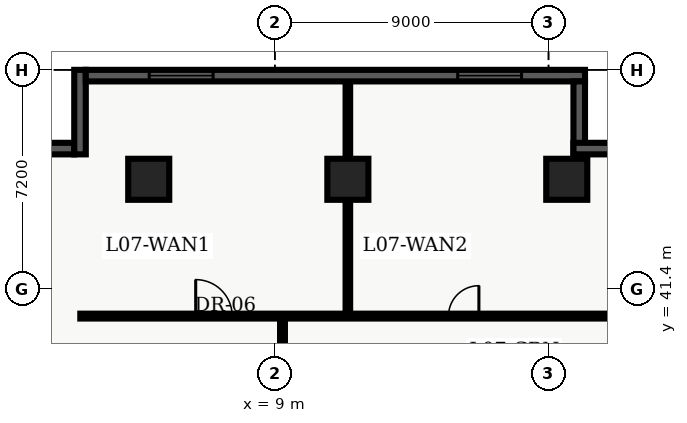
"""IFC4 building model, lengths in metres.
Left out: names, types, materials, properties, quantities, classifications, styles, units other than length and angle.
Written with IfcOpenShell. Run it as: python <this file> out.ifc"""

import sys

from ifc_helpers import new_model, entity, si_unit, converted_unit, direction, frame, origin_with_axes, origin_2d_with_axis, place, context, subcontext, project, spatial, polyline, rectangle, outline, extrude, element, fill, save


model = new_model("IFC4")
c1 = context("Model", 3, precision=1e-05, world=origin_with_axes(), true_north=direction((0.0, 1.0)))
c2 = subcontext(c1, "Body", "Model", "MODEL_VIEW")
j1 = project(units=[si_unit("LENGTHUNIT", "METRE"), converted_unit("PLANEANGLEUNIT", "DEGREE", entity("IfcPlaneAngleMeasure", 0.017), si_unit("PLANEANGLEUNIT", "RADIAN"), dimensions=[0, 0, 0, 0, 0, 0, 0])], contexts=[c1])
p1 = place(None, origin_with_axes())
s1 = spatial("IfcSite", under=j1, at=p1, CompositionType="ELEMENT")
p2 = place(p1, origin_with_axes())
s2 = spatial("IfcBuilding", under=s1, at=p2, CompositionType="ELEMENT")
p3 = place(p2, frame((0.0, 0.0, 32.7), z_axis=(0.0, 0.0, 1.0), x_axis=(1.0, 0.0, 0.0)))
s3 = spatial("IfcBuildingStorey", under=s2, at=p3, CompositionType="ELEMENT", Elevation=32.7)
for number, where, z_axis, x_axis in (
    (1, (11.4, 45.0, 0.0), (0.0, 0.0, 1.0), (1.0, 0.0, 0.0)),
    (2, (18.6, 45.0, 0.0), (0.0, 0.0, 1.0), (1.0, 0.0, 0.0)),
    (3, (4.85, 45.0, 0.0), (0.0, 0.0, 1.0), (1.0, 0.0, 0.0)),
):
    element("IfcColumn", number, at=place(p3, frame(where, z_axis=z_axis, x_axis=x_axis)), inside=s3, PredefinedType="COLUMN", context=c2, shape_type="SweptSolid", body=[
        extrude(rectangle(XDim=1.35, YDim=1.35, at=origin_2d_with_axis()), origin_with_axes(), (0.0, 0.0, 1.0), 3.9),
    ])
p4 = place(p3, frame((2.6, 40.5, 0.0), z_axis=(0.0, 0.0, 1.0), x_axis=(1.0, 0.0, 0.0)))
e4 = element("IfcWall", 4, at=p4, inside=s3, PredefinedType="PARTITIONING", context=c2, shape_type="SweptSolid", body=[
    extrude(outline(polyline([(0.0, -0.08), (18.65, -0.08), (18.65, 0.08), (0.0, 0.08), (0.0, -0.08)])), origin_with_axes(), (0.0, 0.0, 1.0), 2.7),
])
p5 = place(p4, frame((4.395, 0.0, 0.0), z_axis=(0.0, 0.0, 1.0), x_axis=(1.0, 0.0, 0.0)))
e5 = element("IfcOpeningElement", 5, at=p5, cuts=e4, PredefinedType="OPENING", context=c2, shape_type="SweptSolid", body=[
    extrude(rectangle(XDim=1.2, YDim=0.18, at=origin_2d_with_axis()), origin_with_axes(), (0.0, 0.0, 1.0), 2.2),
])
p6 = place(p4, frame((12.61, 0.0, 0.0), z_axis=(0.0, 0.0, 1.0), x_axis=(1.0, 0.0, 0.0)))
e6 = element("IfcOpeningElement", 6, at=p6, cuts=e4, PredefinedType="OPENING", context=c2, shape_type="SweptSolid", body=[
    extrude(rectangle(XDim=1.0, YDim=0.18, at=origin_2d_with_axis()), origin_with_axes(), (0.0, 0.0, 1.0), 2.15),
])
p7 = place(p3, frame((9.25, 24.4, 0.0), z_axis=(0.0, 0.0, 1.0), x_axis=(0.0, 1.0, 0.0)))
e7 = element("IfcWall", 7, at=p7, inside=s3, PredefinedType="PARTITIONING", context=c2, shape_type="SweptSolid", body=[
    extrude(outline(polyline([(0.0, -0.08), (16.1, -0.08), (16.1, 0.08), (0.0, 0.08), (0.0, -0.08)])), origin_with_axes(), (0.0, 0.0, 1.0), 2.7),
])
p8 = place(p7, frame((5.853, 0.0, 0.0), z_axis=(0.0, 0.0, 1.0), x_axis=(1.0, 0.0, 0.0)))
e8 = element("IfcOpeningElement", 8, at=p8, cuts=e7, PredefinedType="OPENING", context=c2, shape_type="SweptSolid", body=[
    extrude(rectangle(XDim=1.0, YDim=0.18, at=origin_2d_with_axis()), origin_with_axes(), (0.0, 0.0, 1.0), 2.15),
])
p9 = place(p7, frame((10.768, 0.0, 0.0), z_axis=(0.0, 0.0, 1.0), x_axis=(1.0, 0.0, 0.0)))
e9 = element("IfcOpeningElement", 9, at=p9, cuts=e7, PredefinedType="OPENING", context=c2, shape_type="SweptSolid", body=[
    extrude(rectangle(XDim=1.0, YDim=0.18, at=origin_2d_with_axis()), origin_with_axes(), (0.0, 0.0, 1.0), 2.15),
])
p10 = place(p3, frame((11.4, 40.6, 0.0), z_axis=(0.0, 0.0, 1.0), x_axis=(0.0, 1.0, 0.0)))
e10 = element("IfcWall", 10, at=p10, inside=s3, PredefinedType="PARTITIONING", context=c2, shape_type="SweptSolid", body=[
    extrude(outline(polyline([(0.0, -0.075), (7.64, -0.075), (7.64, 0.075), (0.0, 0.075), (0.0, -0.075)])), origin_with_axes(), (0.0, 0.0, 1.0), 2.7),
])
p11 = place(p3, frame((0.38, 46.01, 0.0), z_axis=(0.0, 0.0, 1.0), x_axis=(1.0, 0.0, 0.0)))
e11 = element("IfcWall", 11, at=p11, inside=s3, PredefinedType="SOLIDWALL", context=c2, shape_type="SweptSolid", body=[
    extrude(outline(polyline([(0.0, -0.19), (2.02, -0.19), (2.02, 0.19), (0.0, 0.19), (0.0, -0.19)])), origin_with_axes(), (0.0, 0.0, 1.0), 3.66),
])
p12 = place(p3, frame((2.59, 45.82, 0.0), z_axis=(0.0, 0.0, 1.0), x_axis=(0.0, 1.0, 0.0)))
e12 = element("IfcWall", 12, at=p12, inside=s3, PredefinedType="SOLIDWALL", context=c2, shape_type="SweptSolid", body=[
    extrude(outline(polyline([(0.0, -0.19), (2.78, -0.19), (2.78, 0.19), (0.0, 0.19), (0.0, -0.19)])), origin_with_axes(), (0.0, 0.0, 1.0), 3.66),
])
p13 = place(p3, frame((2.78, 48.41, 0.0), z_axis=(0.0, 0.0, 1.0), x_axis=(1.0, 0.0, 0.0)))
e13 = element("IfcWall", 13, at=p13, inside=s3, PredefinedType="SOLIDWALL", context=c2, shape_type="SweptSolid", body=[
    extrude(outline(polyline([(0.0, -0.19), (16.42, -0.19), (16.42, 0.19), (0.0, 0.19), (0.0, -0.19)])), origin_with_axes(), (0.0, 0.0, 1.0), 3.66),
])
p14 = place(p13, frame((3.137, 0.0, 0.45), z_axis=(0.0, 0.0, 1.0), x_axis=(1.0, 0.0, 0.0)))
e14 = element("IfcOpeningElement", 14, at=p14, cuts=e13, PredefinedType="OPENING", context=c2, shape_type="SweptSolid", body=[
    extrude(rectangle(XDim=2.1, YDim=0.4, at=origin_2d_with_axis()), origin_with_axes(), (0.0, 0.0, 1.0), 2.2),
])
p15 = place(p13, frame((13.283, 0.0, 0.45), z_axis=(0.0, 0.0, 1.0), x_axis=(1.0, 0.0, 0.0)))
e15 = element("IfcOpeningElement", 15, at=p15, cuts=e13, PredefinedType="OPENING", context=c2, shape_type="SweptSolid", body=[
    extrude(rectangle(XDim=2.1, YDim=0.4, at=origin_2d_with_axis()), origin_with_axes(), (0.0, 0.0, 1.0), 2.2),
])
p16 = place(p3, frame((19.01, 48.22, 0.0), z_axis=(0.0, 0.0, 1.0), x_axis=(0.0, -1.0, 0.0)))
e16 = element("IfcWall", 16, at=p16, inside=s3, PredefinedType="SOLIDWALL", context=c2, shape_type="SweptSolid", body=[
    extrude(outline(polyline([(0.0, -0.19), (2.56, -0.19), (2.56, 0.19), (0.0, 0.19), (0.0, -0.19)])), origin_with_axes(), (0.0, 0.0, 1.0), 3.66),
])
p17 = place(p3, frame((18.82, 46.01, 0.0), z_axis=(0.0, 0.0, 1.0), x_axis=(1.0, 0.0, 0.0)))
e17 = element("IfcWall", 17, at=p17, inside=s3, PredefinedType="SOLIDWALL", context=c2, shape_type="SweptSolid", body=[
    extrude(outline(polyline([(0.0, -0.19), (2.78, -0.19), (2.78, 0.19), (0.0, 0.19), (0.0, -0.19)])), origin_with_axes(), (0.0, 0.0, 1.0), 3.66),
])
p18 = place(p4, frame((4.395, 0.0, 0.0), z_axis=(0.0, 0.0, 1.0), x_axis=(1.0, 0.0, 0.0)))
e18 = element("IfcDoor", 18, at=p18, inside=s3, OperationType="SINGLE_SWING_LEFT", PredefinedType="DOOR", context=c2, shape_type="SweptSolid", body=[
    extrude(rectangle(XDim=1.2, YDim=0.09, at=origin_2d_with_axis()), origin_with_axes(), (0.0, 0.0, 1.0), 2.2),
])
fill(e5, e18)
p19 = place(p4, frame((12.61, 0.0, 0.0), z_axis=(0.0, 0.0, 1.0), x_axis=(1.0, 0.0, 0.0)))
e19 = element("IfcDoor", 19, at=p19, inside=s3, OperationType="SINGLE_SWING_RIGHT", PredefinedType="DOOR", context=c2, shape_type="SweptSolid", body=[
    extrude(rectangle(XDim=1.0, YDim=0.09, at=origin_2d_with_axis()), origin_with_axes(), (0.0, 0.0, 1.0), 2.15),
])
fill(e6, e19)
p20 = place(p13, frame((3.137, 0.0, 0.45), z_axis=(0.0, 0.0, 1.0), x_axis=(1.0, 0.0, 0.0)))
e20 = element("IfcWindow", 20, at=p20, inside=s3, PredefinedType="WINDOW", context=c2, shape_type="SweptSolid", body=[
    extrude(rectangle(XDim=2.1, YDim=0.09, at=origin_2d_with_axis()), origin_with_axes(), (0.0, 0.0, 1.0), 2.2),
])
fill(e14, e20)
p21 = place(p13, frame((13.283, 0.0, 0.45), z_axis=(0.0, 0.0, 1.0), x_axis=(1.0, 0.0, 0.0)))
e21 = element("IfcWindow", 21, at=p21, inside=s3, PredefinedType="WINDOW", context=c2, shape_type="SweptSolid", body=[
    extrude(rectangle(XDim=2.1, YDim=0.09, at=origin_2d_with_axis()), origin_with_axes(), (0.0, 0.0, 1.0), 2.2),
])
fill(e15, e21)
save(model, sys.argv[1])
